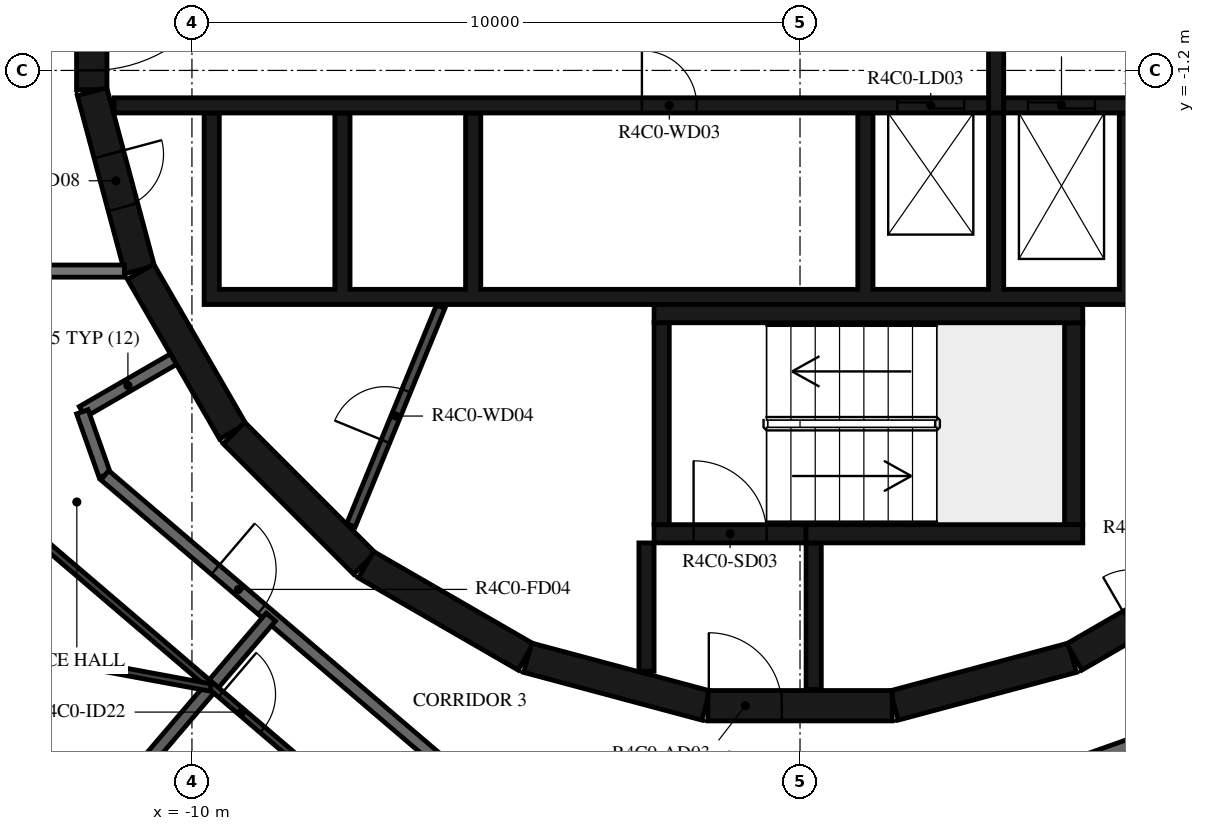
"""IFC4 building model, lengths in metres.
Left out: names, types, materials, properties, quantities, classifications, styles, units other than length and angle.
Written with IfcOpenShell. Run it as: python <this file> out.ifc"""

import sys

from ifc_helpers import new_model, si_unit, direction, frame, frame_2d, origin, place, context, subcontext, project, spatial, polyline, rectangle, outline, extrude, element, fill, save


model = new_model("IFC4")
c1 = context("Model", 3, precision=1e-05, world=origin(), true_north=direction((0.0, 1.0)))
c2 = subcontext(c1, "Body", "Model", "MODEL_VIEW")
j1 = project(units=[si_unit("LENGTHUNIT", "METRE"), si_unit("PLANEANGLEUNIT", "RADIAN")], contexts=[c1])
p1 = place(None, origin())
s1 = spatial("IfcSite", under=j1, at=p1, CompositionType="ELEMENT")
p2 = place(p1, origin())
s2 = spatial("IfcBuilding", under=s1, at=p2, CompositionType="ELEMENT")
p3 = place(p2, frame((0.0, 0.0, 179.7)))
s3 = spatial("IfcBuildingStorey", under=s2, at=p3, CompositionType="ELEMENT", Elevation=179.7)
p4 = place(p3, frame((1.55, -11.643, 0.0), z_axis=(0.0, 0.0, 1.0), x_axis=(0.965948410781, 0.258734743916, 0.0)))
e1 = element("IfcWall", 1, at=p4, inside=s3, PredefinedType="SHEAR", context=c2, shape_type="SweptSolid", body=[
    extrude(rectangle(XDim=3.033, YDim=0.5, at=frame_2d((1.516, 0.0))), origin(), (0.0, 0.0, 1.0), 3.05),
])
p5 = place(p3, frame((4.51, -10.845, 0.0), z_axis=(0.0, 0.0, 1.0), x_axis=(0.865975092491, 0.500087131594, 0.0)))
e2 = element("IfcWall", 2, at=p5, inside=s3, PredefinedType="SHEAR", context=c2, shape_type="SweptSolid", body=[
    extrude(rectangle(XDim=3.033, YDim=0.5, at=frame_2d((1.516, 0.0))), origin(), (0.0, 0.0, 1.0), 3.05),
])
p6 = place(p5, frame((1.066, 0.0, 0.0)))
e3 = element("IfcOpeningElement", 3, at=p6, cuts=e2, PredefinedType="OPENING", context=c2, shape_type="SweptSolid", body=[
    extrude(rectangle(XDim=0.9, YDim=2.1, at=frame_2d((0.45, 1.05))), frame((0.0, 0.26, 0.0), z_axis=(0.0, -1.0, 0.0), x_axis=(1.0, 0.0, 0.0)), (0.0, 0.0, 1.0), 0.52),
])
p7 = place(p3, frame((-11.647, 1.516, 0.0), z_axis=(0.0, 0.0, 1.0), x_axis=(0.0, -1.0, 0.0)))
e4 = element("IfcWall", 4, at=p7, inside=s3, PredefinedType="SHEAR", context=c2, shape_type="SweptSolid", body=[
    extrude(rectangle(XDim=3.033, YDim=0.5, at=frame_2d((1.516, 0.0))), origin(), (0.0, 0.0, 1.0), 3.05),
])
p8 = place(p7, frame((0.316, 0.0, 0.0)))
e5 = element("IfcOpeningElement", 5, at=p8, cuts=e4, PredefinedType="OPENING", context=c2, shape_type="SweptSolid", body=[
    extrude(rectangle(XDim=2.4, YDim=2.1, at=frame_2d((1.2, 1.05))), frame((0.0, 0.26, 0.0), z_axis=(0.0, -1.0, 0.0), x_axis=(1.0, 0.0, 0.0)), (0.0, 0.0, 1.0), 0.52),
])
p9 = place(p3, frame((-11.643, -1.55, 0.0), z_axis=(0.0, 0.0, 1.0), x_axis=(0.258734743916, -0.965948410781, 0.0)))
e6 = element("IfcWall", 6, at=p9, inside=s3, PredefinedType="SHEAR", context=c2, shape_type="SweptSolid", body=[
    extrude(rectangle(XDim=3.033, YDim=0.5, at=frame_2d((1.516, 0.0))), origin(), (0.0, 0.0, 1.0), 3.05),
])
p10 = place(p9, frame((1.066, 0.0, 0.0)))
e7 = element("IfcOpeningElement", 7, at=p10, cuts=e6, PredefinedType="OPENING", context=c2, shape_type="SweptSolid", body=[
    extrude(rectangle(XDim=0.9, YDim=2.1, at=frame_2d((0.45, 1.05))), frame((0.0, 0.26, 0.0), z_axis=(0.0, -1.0, 0.0), x_axis=(1.0, 0.0, 0.0)), (0.0, 0.0, 1.0), 0.52),
])
p11 = place(p3, frame((-10.845, -4.51, 0.0), z_axis=(0.0, 0.0, 1.0), x_axis=(0.500087131594, -0.865975092491, 0.0)))
e8 = element("IfcWall", 8, at=p11, inside=s3, PredefinedType="SHEAR", context=c2, shape_type="SweptSolid", body=[
    extrude(rectangle(XDim=3.033, YDim=0.5, at=frame_2d((1.516, 0.0))), origin(), (0.0, 0.0, 1.0), 3.05),
])
p12 = place(p3, frame((-9.308, -7.164, 0.0), z_axis=(0.0, 0.0, 1.0), x_axis=(0.707106781187, -0.707106781187, 0.0)))
e9 = element("IfcWall", 9, at=p12, inside=s3, PredefinedType="SHEAR", context=c2, shape_type="SweptSolid", body=[
    extrude(rectangle(XDim=3.032, YDim=0.5, at=frame_2d((1.516, 0.0))), origin(), (0.0, 0.0, 1.0), 3.05),
])
for number, where, z_axis, x_axis in (
    (10, (-7.137, -9.329, 0.0), (0.0, 0.0, 1.0), (0.866, -0.5, 0.0)),
    (11, (-4.479, -10.858, 0.0), (0.0, 0.0, 1.0), (0.966, -0.259, 0.0)),
):
    element("IfcWall", number, at=place(p3, frame(where, z_axis=z_axis, x_axis=x_axis)), inside=s3, PredefinedType="SHEAR", context=c2, shape_type="SweptSolid", body=[
        extrude(rectangle(XDim=3.033, YDim=0.5, at=frame_2d((1.516, 0.0))), origin(), (0.0, 0.0, 1.0), 3.05),
    ])
p13 = place(p3, frame((-1.516, -11.647, 0.0), z_axis=(0.0, 0.0, 1.0), x_axis=(1.0, 0.0, 0.0)))
e12 = element("IfcWall", 12, at=p13, inside=s3, PredefinedType="SHEAR", context=c2, shape_type="SweptSolid", body=[
    extrude(rectangle(XDim=3.033, YDim=0.5, at=frame_2d((1.516, 0.0))), origin(), (0.0, 0.0, 1.0), 3.05),
])
p14 = place(p13, frame((0.016, 0.0, 0.0)))
e13 = element("IfcOpeningElement", 13, at=p14, cuts=e12, PredefinedType="OPENING", context=c2, shape_type="SweptSolid", body=[
    extrude(rectangle(XDim=1.2, YDim=2.1, at=frame_2d((0.6, 1.05))), frame((0.0, 0.26, 0.0), z_axis=(0.0, -1.0, 0.0), x_axis=(1.0, 0.0, 0.0)), (0.0, 0.0, 1.0), 0.52),
])
p15 = place(p3, frame((-2.275, -8.67, 0.0), z_axis=(0.0, 0.0, 1.0), x_axis=(0.0, 1.0, 0.0)))
e14 = element("IfcWall", 14, at=p15, inside=s3, PredefinedType="SHEAR", context=c2, shape_type="SweptSolid", body=[
    extrude(rectangle(XDim=3.32, YDim=0.25, at=frame_2d((1.66, 0.0))), origin(), (0.0, 0.0, 1.0), 3.05),
])
p16 = place(p3, frame((-2.4, -5.2, 0.0), z_axis=(0.0, 0.0, 1.0), x_axis=(1.0, 0.0, 0.0)))
e15 = element("IfcWall", 15, at=p16, inside=s3, PredefinedType="SHEAR", context=c2, shape_type="SweptSolid", body=[
    extrude(rectangle(XDim=7.05, YDim=0.3, at=frame_2d((3.525, 0.0))), origin(), (0.0, 0.0, 1.0), 3.05),
])
p17 = place(p3, frame((4.5, -8.67, 0.0), z_axis=(0.0, 0.0, 1.0), x_axis=(0.0, 1.0, 0.0)))
e16 = element("IfcWall", 16, at=p17, inside=s3, PredefinedType="SHEAR", context=c2, shape_type="SweptSolid", body=[
    extrude(rectangle(XDim=3.32, YDim=0.3, at=frame_2d((1.66, 0.0))), origin(), (0.0, 0.0, 1.0), 3.05),
])
p18 = place(p3, frame((0.1, -8.82, 0.0), z_axis=(0.0, 0.0, 1.0), x_axis=(1.0, 0.0, 0.0)))
e17 = element("IfcWall", 17, at=p18, inside=s3, PredefinedType="SHEAR", context=c2, shape_type="SweptSolid", body=[
    extrude(rectangle(XDim=4.55, YDim=0.3, at=frame_2d((2.275, 0.0))), origin(), (0.0, 0.0, 1.0), 3.05),
])
p19 = place(p3, frame((-2.4, -8.82, 0.0), z_axis=(0.0, 0.0, 1.0), x_axis=(1.0, 0.0, 0.0)))
e18 = element("IfcWall", 18, at=p19, inside=s3, PredefinedType="SHEAR", context=c2, shape_type="SweptSolid", body=[
    extrude(rectangle(XDim=2.5, YDim=0.3, at=frame_2d((1.25, 0.0))), origin(), (0.0, 0.0, 1.0), 3.05),
])
p20 = place(p19, frame((0.65, 0.0, 0.0)))
e19 = element("IfcOpeningElement", 19, at=p20, cuts=e18, PredefinedType="OPENING", context=c2, shape_type="SweptSolid", body=[
    extrude(rectangle(XDim=1.2, YDim=2.1, at=frame_2d((0.6, 1.05))), frame((0.0, 0.16, 0.0), z_axis=(0.0, -1.0, 0.0), x_axis=(1.0, 0.0, 0.0)), (0.0, 0.0, 1.0), 0.32),
])
p21 = place(p3, frame((-2.525, -8.97, 0.0), z_axis=(0.0, 0.0, 1.0), x_axis=(0.0, -1.0, 0.0)))
e20 = element("IfcWall", 20, at=p21, inside=s3, PredefinedType="SHEAR", context=c2, shape_type="SweptSolid", body=[
    extrude(rectangle(XDim=2.11, YDim=0.25, at=frame_2d((1.055, 0.0))), origin(), (0.0, 0.0, 1.0), 3.05),
])
p22 = place(p3, frame((0.225, -8.97, 0.0), z_axis=(0.0, 0.0, 1.0), x_axis=(0.0, -1.0, 0.0)))
e21 = element("IfcWall", 21, at=p22, inside=s3, PredefinedType="SHEAR", context=c2, shape_type="SweptSolid", body=[
    extrude(rectangle(XDim=2.41, YDim=0.25, at=frame_2d((1.205, 0.0))), origin(), (0.0, 0.0, 1.0), 3.05),
])
p23 = place(p3, origin())
e22 = element("IfcWall", 22, at=p23, inside=s3, PredefinedType="SHEAR", context=c2, shape_type="SweptSolid", body=[
    extrude(outline(polyline([(9.8, -5.05), (9.8, -4.8), (9.8, -1.9), (9.55, -1.9), (9.55, -4.8), (7.65, -4.8), (7.65, -1.9), (7.4, -1.9), (7.4, -4.8), (5.5, -4.8), (5.5, -1.9), (5.25, -1.9), (5.25, -4.8), (3.35, -4.8), (3.35, -1.9), (3.1, -1.9), (3.1, -4.8), (1.2, -4.8), (1.2, -1.9), (0.95, -1.9), (0.95, -4.8), (-5.25, -4.8), (-5.25, -1.9), (-5.5, -1.9), (-5.5, -4.8), (-7.4, -4.8), (-7.4, -1.9), (-7.65, -1.9), (-7.65, -4.8), (-9.55, -4.8), (-9.55, -1.9), (-9.8, -1.9), (-9.8, -4.8), (-9.8, -5.05), (9.8, -5.05)])), origin(), (0.0, 0.0, 1.0), 3.05),
])
p24 = place(p3, frame((-11.28, -1.775, 0.0), z_axis=(0.0, 0.0, 1.0), x_axis=(1.0, 0.0, 0.0)))
e23 = element("IfcWall", 23, at=p24, inside=s3, PredefinedType="SHEAR", context=c2, shape_type="SweptSolid", body=[
    extrude(rectangle(XDim=14.38, YDim=0.25, at=frame_2d((7.19, 0.0))), origin(), (0.0, 0.0, 1.0), 3.05),
])
p25 = place(p24, frame((12.88, 0.0, 0.0)))
e24 = element("IfcOpeningElement", 24, at=p25, cuts=e23, PredefinedType="OPENING", context=c2, shape_type="SweptSolid", body=[
    extrude(rectangle(XDim=1.1, YDim=2.1, at=frame_2d((0.55, 1.05))), frame((0.0, 0.135, 0.0), z_axis=(0.0, -1.0, 0.0), x_axis=(1.0, 0.0, 0.0)), (0.0, 0.0, 1.0), 0.27),
])
p26 = place(p24, frame((8.68, 0.0, 0.0)))
e25 = element("IfcOpeningElement", 25, at=p26, cuts=e23, PredefinedType="OPENING", context=c2, shape_type="SweptSolid", body=[
    extrude(rectangle(XDim=0.9, YDim=2.1, at=frame_2d((0.45, 1.05))), frame((0.0, 0.135, 0.0), z_axis=(0.0, -1.0, 0.0), x_axis=(1.0, 0.0, 0.0)), (0.0, 0.0, 1.0), 0.27),
])
p27 = place(p3, frame((3.35, -1.775, 0.0), z_axis=(0.0, 0.0, 1.0), x_axis=(1.0, 0.0, 0.0)))
e26 = element("IfcWall", 26, at=p27, inside=s3, PredefinedType="SHEAR", context=c2, shape_type="SweptSolid", body=[
    extrude(rectangle(XDim=7.93, YDim=0.25, at=frame_2d((3.965, 0.0))), origin(), (0.0, 0.0, 1.0), 3.05),
])
p28 = place(p27, frame((0.4, 0.0, 0.0)))
e27 = element("IfcOpeningElement", 27, at=p28, cuts=e26, PredefinedType="OPENING", context=c2, shape_type="SweptSolid", body=[
    extrude(rectangle(XDim=1.1, YDim=2.4, at=frame_2d((0.55, 1.2))), frame((0.0, 0.135, 0.0), z_axis=(0.0, -1.0, 0.0), x_axis=(1.0, 0.0, 0.0)), (0.0, 0.0, 1.0), 0.27),
])
p29 = place(p27, frame((2.55, 0.0, 0.0)))
e28 = element("IfcOpeningElement", 28, at=p29, cuts=e26, PredefinedType="OPENING", context=c2, shape_type="SweptSolid", body=[
    extrude(rectangle(XDim=1.1, YDim=2.4, at=frame_2d((0.55, 1.2))), frame((0.0, 0.135, 0.0), z_axis=(0.0, -1.0, 0.0), x_axis=(1.0, 0.0, 0.0)), (0.0, 0.0, 1.0), 0.27),
])
p30 = place(p27, frame((4.7, 0.0, 0.0)))
e29 = element("IfcOpeningElement", 29, at=p30, cuts=e26, PredefinedType="OPENING", context=c2, shape_type="SweptSolid", body=[
    extrude(rectangle(XDim=1.1, YDim=2.4, at=frame_2d((0.55, 1.2))), frame((0.0, 0.135, 0.0), z_axis=(0.0, -1.0, 0.0), x_axis=(1.0, 0.0, 0.0)), (0.0, 0.0, 1.0), 0.27),
])
p31 = place(p3, frame((3.225, -1.9, 0.0), z_axis=(0.0, 0.0, 1.0), x_axis=(0.0, 1.0, 0.0)))
e30 = element("IfcWall", 30, at=p31, inside=s3, PredefinedType="SHEAR", context=c2, shape_type="SweptSolid", body=[
    extrude(rectangle(XDim=3.8, YDim=0.25, at=frame_2d((1.9, 0.0))), origin(), (0.0, 0.0, 1.0), 3.05),
])
p32 = place(p3, frame((-7.385, -8.681, 0.0), z_axis=(0.0, 0.0, 1.0), x_axis=(0.379804590409, 0.925066739811, 0.0)))
e31 = element("IfcWall", 31, at=p32, inside=s3, PredefinedType="PARTITIONING", context=c2, shape_type="SweptSolid", body=[
    extrude(rectangle(XDim=3.885, YDim=0.15, at=frame_2d((1.942, 0.0))), origin(), (0.0, 0.0, 1.0), 3.05),
])
p33 = place(p32, frame((1.493, 0.0, 0.0)))
e32 = element("IfcOpeningElement", 32, at=p33, cuts=e31, PredefinedType="OPENING", context=c2, shape_type="SweptSolid", body=[
    extrude(rectangle(XDim=0.9, YDim=2.1, at=frame_2d((0.45, 1.05))), frame((0.0, 0.085, 0.0), z_axis=(0.0, -1.0, 0.0), x_axis=(1.0, 0.0, 0.0)), (0.0, 0.0, 1.0), 0.17),
])
p34 = place(p3, frame((-10.303, -5.949, 0.0), z_axis=(0.0, 0.0, 1.0), x_axis=(-0.866021168401, -0.500007335828, 0.0)))
e33 = element("IfcWall", 33, at=p34, inside=s3, PredefinedType="STANDARD", context=c2, shape_type="SweptSolid", body=[
    extrude(rectangle(XDim=1.731, YDim=0.2, at=frame_2d((0.865, 0.0))), origin(), (0.0, 0.0, 1.0), 3.05),
])
p35 = place(p3, frame((-11.802, -6.814, 0.0), z_axis=(0.0, 0.0, 1.0), x_axis=(0.333904297771, -0.942606980629, 0.0)))
e34 = element("IfcWall", 34, at=p35, inside=s3, PredefinedType="STANDARD", context=c2, shape_type="SweptSolid", body=[
    extrude(rectangle(XDim=1.107, YDim=0.2, at=frame_2d((0.553, 0.0))), origin(), (0.0, 0.0, 1.0), 3.05),
])
p36 = place(p3, frame((-11.433, -7.858, 0.0), z_axis=(0.0, 0.0, 1.0), x_axis=(0.760412154545, -0.649440801937, 0.0)))
e35 = element("IfcWall", 35, at=p36, inside=s3, PredefinedType="STANDARD", context=c2, shape_type="SweptSolid", body=[
    extrude(rectangle(XDim=7.181, YDim=0.2, at=frame_2d((3.59, 0.0))), origin(), (0.0, 0.0, 1.0), 3.05),
])
p37 = place(p36, frame((2.39, 0.0, 0.0)))
e36 = element("IfcOpeningElement", 36, at=p37, cuts=e35, PredefinedType="OPENING", context=c2, shape_type="SweptSolid", body=[
    extrude(rectangle(XDim=1.0, YDim=2.1, at=frame_2d((0.5, 1.05))), frame((0.0, 0.11, 0.0), z_axis=(0.0, -1.0, 0.0), x_axis=(1.0, 0.0, 0.0)), (0.0, 0.0, 1.0), 0.22),
])
p38 = place(p3, frame((1.088, -13.83, 0.0), z_axis=(0.0, 0.0, 1.0), x_axis=(0.942648397945, 0.333787354241, 0.0)))
e37 = element("IfcWall", 37, at=p38, inside=s3, PredefinedType="STANDARD", context=c2, shape_type="SweptSolid", body=[
    extrude(rectangle(XDim=7.181, YDim=0.2, at=frame_2d((3.591, 0.0))), origin(), (0.0, 0.0, 1.0), 3.05),
])
p39 = place(p38, frame((0.2, 0.0, 0.0)))
e38 = element("IfcOpeningElement", 38, at=p39, cuts=e37, PredefinedType="OPENING", context=c2, shape_type="SweptSolid", body=[
    extrude(rectangle(XDim=1.0, YDim=2.1, at=frame_2d((0.5, 1.05))), frame((0.0, 0.11, 0.0), z_axis=(0.0, -1.0, 0.0), x_axis=(1.0, 0.0, 0.0)), (0.0, 0.0, 1.0), 0.22),
])
p40 = place(p3, frame((-17.9, -4.5, 0.0), z_axis=(0.0, 0.0, 1.0), x_axis=(1.0, 0.0, 0.0)))
e39 = element("IfcWall", 39, at=p40, inside=s3, PredefinedType="STANDARD", context=c2, shape_type="SweptSolid", body=[
    extrude(rectangle(XDim=6.789, YDim=0.2, at=frame_2d((3.394, 0.0))), origin(), (0.0, 0.0, 1.0), 3.05),
])
p41 = place(p3, frame((-11.838, -13.86, 0.0), z_axis=(0.0, 0.0, 1.0), x_axis=(0.64944503311, 0.760408540831, 0.0)))
e40 = element("IfcWall", 40, at=p41, inside=s3, PredefinedType="STANDARD", context=c2, shape_type="SweptSolid", body=[
    extrude(rectangle(XDim=4.827, YDim=0.2, at=frame_2d((2.414, 0.0))), origin(), (0.0, 0.0, 1.0), 3.05),
])
p42 = place(p3, frame((-12.713, -8.737, 0.0), z_axis=(0.0, 0.0, 1.0), x_axis=(0.760432387723, -0.649417110725, 0.0)))
e41 = element("IfcWall", 41, at=p42, inside=s3, PredefinedType="PARTITIONING", context=c2, shape_type="SweptSolid", body=[
    extrude(rectangle(XDim=6.032, YDim=0.12, at=frame_2d((3.016, 0.0))), origin(), (0.0, 0.0, 1.0), 3.05),
])
p43 = place(p42, frame((4.192, 0.0, 0.0)))
e42 = element("IfcOpeningElement", 42, at=p43, cuts=e41, PredefinedType="OPENING", context=c2, shape_type="SweptSolid", body=[
    extrude(rectangle(XDim=0.9, YDim=2.1, at=frame_2d((0.45, 1.05))), frame((0.0, 0.07, 0.0), z_axis=(0.0, -1.0, 0.0), x_axis=(1.0, 0.0, 0.0)), (0.0, 0.0, 1.0), 0.14),
])
p44 = place(p3, frame((-16.252, -10.133, 0.0), z_axis=(0.0, 0.0, 1.0), x_axis=(0.983256998026, -0.182224246005, 0.0)))
e43 = element("IfcWall", 43, at=p44, inside=s3, PredefinedType="PARTITIONING", context=c2, shape_type="SweptSolid", body=[
    extrude(rectangle(XDim=6.671, YDim=0.12, at=frame_2d((3.335, 0.0))), origin(), (0.0, 0.0, 1.0), 3.05),
])
p45 = place(p44, frame((0.2, 0.0, 0.0)))
e44 = element("IfcOpeningElement", 44, at=p45, cuts=e43, PredefinedType="OPENING", context=c2, shape_type="SweptSolid", body=[
    extrude(rectangle(XDim=0.9, YDim=2.1, at=frame_2d((0.45, 1.05))), frame((0.0, 0.07, 0.0), z_axis=(0.0, -1.0, 0.0), x_axis=(1.0, 0.0, 0.0)), (0.0, 0.0, 1.0), 0.14),
])
p46 = place(p20, origin())
e45 = element("IfcDoor", 45, at=p46, inside=s3, OperationType="SINGLE_SWING_LEFT", PredefinedType="DOOR", context=c2, shape_type="SweptSolid", body=[
    extrude(rectangle(XDim=1.2, YDim=2.1, at=frame_2d((0.6, 1.05))), frame((0.0, 0.025, 0.0), z_axis=(0.0, -1.0, 0.0), x_axis=(1.0, 0.0, 0.0)), (0.0, 0.0, 1.0), 0.05),
])
fill(e19, e45)
p47 = place(p14, origin())
e46 = element("IfcDoor", 46, at=p47, inside=s3, OperationType="SINGLE_SWING_RIGHT", PredefinedType="DOOR", context=c2, shape_type="SweptSolid", body=[
    extrude(rectangle(XDim=1.2, YDim=2.1, at=frame_2d((0.6, 1.05))), frame((0.0, 0.025, 0.0), z_axis=(0.0, -1.0, 0.0), x_axis=(1.0, 0.0, 0.0)), (0.0, 0.0, 1.0), 0.05),
])
fill(e13, e46)
p48 = place(p8, origin())
e47 = element("IfcDoor", 47, at=p48, inside=s3, OperationType="DOUBLE_DOOR_SINGLE_SWING", PredefinedType="DOOR", context=c2, shape_type="SweptSolid", body=[
    extrude(rectangle(XDim=2.4, YDim=2.1, at=frame_2d((1.2, 1.05))), frame((0.0, 0.025, 0.0), z_axis=(0.0, -1.0, 0.0), x_axis=(1.0, 0.0, 0.0)), (0.0, 0.0, 1.0), 0.05),
])
fill(e5, e47)
p49 = place(p25, origin())
e48 = element("IfcDoor", 48, at=p49, inside=s3, OperationType="DOUBLE_DOOR_SLIDING", PredefinedType="DOOR", context=c2, shape_type="SweptSolid", body=[
    extrude(rectangle(XDim=1.1, YDim=2.1, at=frame_2d((0.55, 1.05))), frame((0.0, 0.025, 0.0), z_axis=(0.0, -1.0, 0.0), x_axis=(1.0, 0.0, 0.0)), (0.0, 0.0, 1.0), 0.05),
])
fill(e24, e48)
p50 = place(p28, origin())
e49 = element("IfcDoor", 49, at=p50, inside=s3, OperationType="DOUBLE_DOOR_SLIDING", PredefinedType="DOOR", context=c2, shape_type="SweptSolid", body=[
    extrude(rectangle(XDim=1.1, YDim=2.4, at=frame_2d((0.55, 1.2))), frame((0.0, 0.025, 0.0), z_axis=(0.0, -1.0, 0.0), x_axis=(1.0, 0.0, 0.0)), (0.0, 0.0, 1.0), 0.05),
])
fill(e27, e49)
p51 = place(p26, origin())
e50 = element("IfcDoor", 50, at=p51, inside=s3, OperationType="SINGLE_SWING_LEFT", PredefinedType="DOOR", context=c2, shape_type="SweptSolid", body=[
    extrude(rectangle(XDim=0.9, YDim=2.1, at=frame_2d((0.45, 1.05))), frame((0.0, 0.025, 0.0), z_axis=(0.0, -1.0, 0.0), x_axis=(1.0, 0.0, 0.0)), (0.0, 0.0, 1.0), 0.05),
])
fill(e25, e50)
p52 = place(p33, origin())
e51 = element("IfcDoor", 51, at=p52, inside=s3, OperationType="SINGLE_SWING_RIGHT", PredefinedType="DOOR", context=c2, shape_type="SweptSolid", body=[
    extrude(rectangle(XDim=0.9, YDim=2.1, at=frame_2d((0.45, 1.05))), frame((0.0, 0.025, 0.0), z_axis=(0.0, -1.0, 0.0), x_axis=(1.0, 0.0, 0.0)), (0.0, 0.0, 1.0), 0.05),
])
fill(e32, e51)
p53 = place(p10, origin())
e52 = element("IfcDoor", 52, at=p53, inside=s3, OperationType="SINGLE_SWING_RIGHT", PredefinedType="DOOR", context=c2, shape_type="SweptSolid", body=[
    extrude(rectangle(XDim=0.9, YDim=2.1, at=frame_2d((0.45, 1.05))), frame((0.0, 0.025, 0.0), z_axis=(0.0, -1.0, 0.0), x_axis=(1.0, 0.0, 0.0)), (0.0, 0.0, 1.0), 0.05),
])
fill(e7, e52)
p54 = place(p37, origin())
e53 = element("IfcDoor", 53, at=p54, inside=s3, OperationType="SINGLE_SWING_RIGHT", PredefinedType="DOOR", context=c2, shape_type="SweptSolid", body=[
    extrude(rectangle(XDim=1.0, YDim=2.1, at=frame_2d((0.5, 1.05))), frame((0.0, 0.025, 0.0), z_axis=(0.0, -1.0, 0.0), x_axis=(1.0, 0.0, 0.0)), (0.0, 0.0, 1.0), 0.05),
])
fill(e36, e53)
p55 = place(p43, origin())
e54 = element("IfcDoor", 54, at=p55, inside=s3, OperationType="SINGLE_SWING_LEFT", PredefinedType="DOOR", context=c2, shape_type="SweptSolid", body=[
    extrude(rectangle(XDim=0.9, YDim=2.1, at=frame_2d((0.45, 1.05))), frame((0.0, 0.025, 0.0), z_axis=(0.0, -1.0, 0.0), x_axis=(1.0, 0.0, 0.0)), (0.0, 0.0, 1.0), 0.05),
])
fill(e42, e54)
save(model, sys.argv[1])
